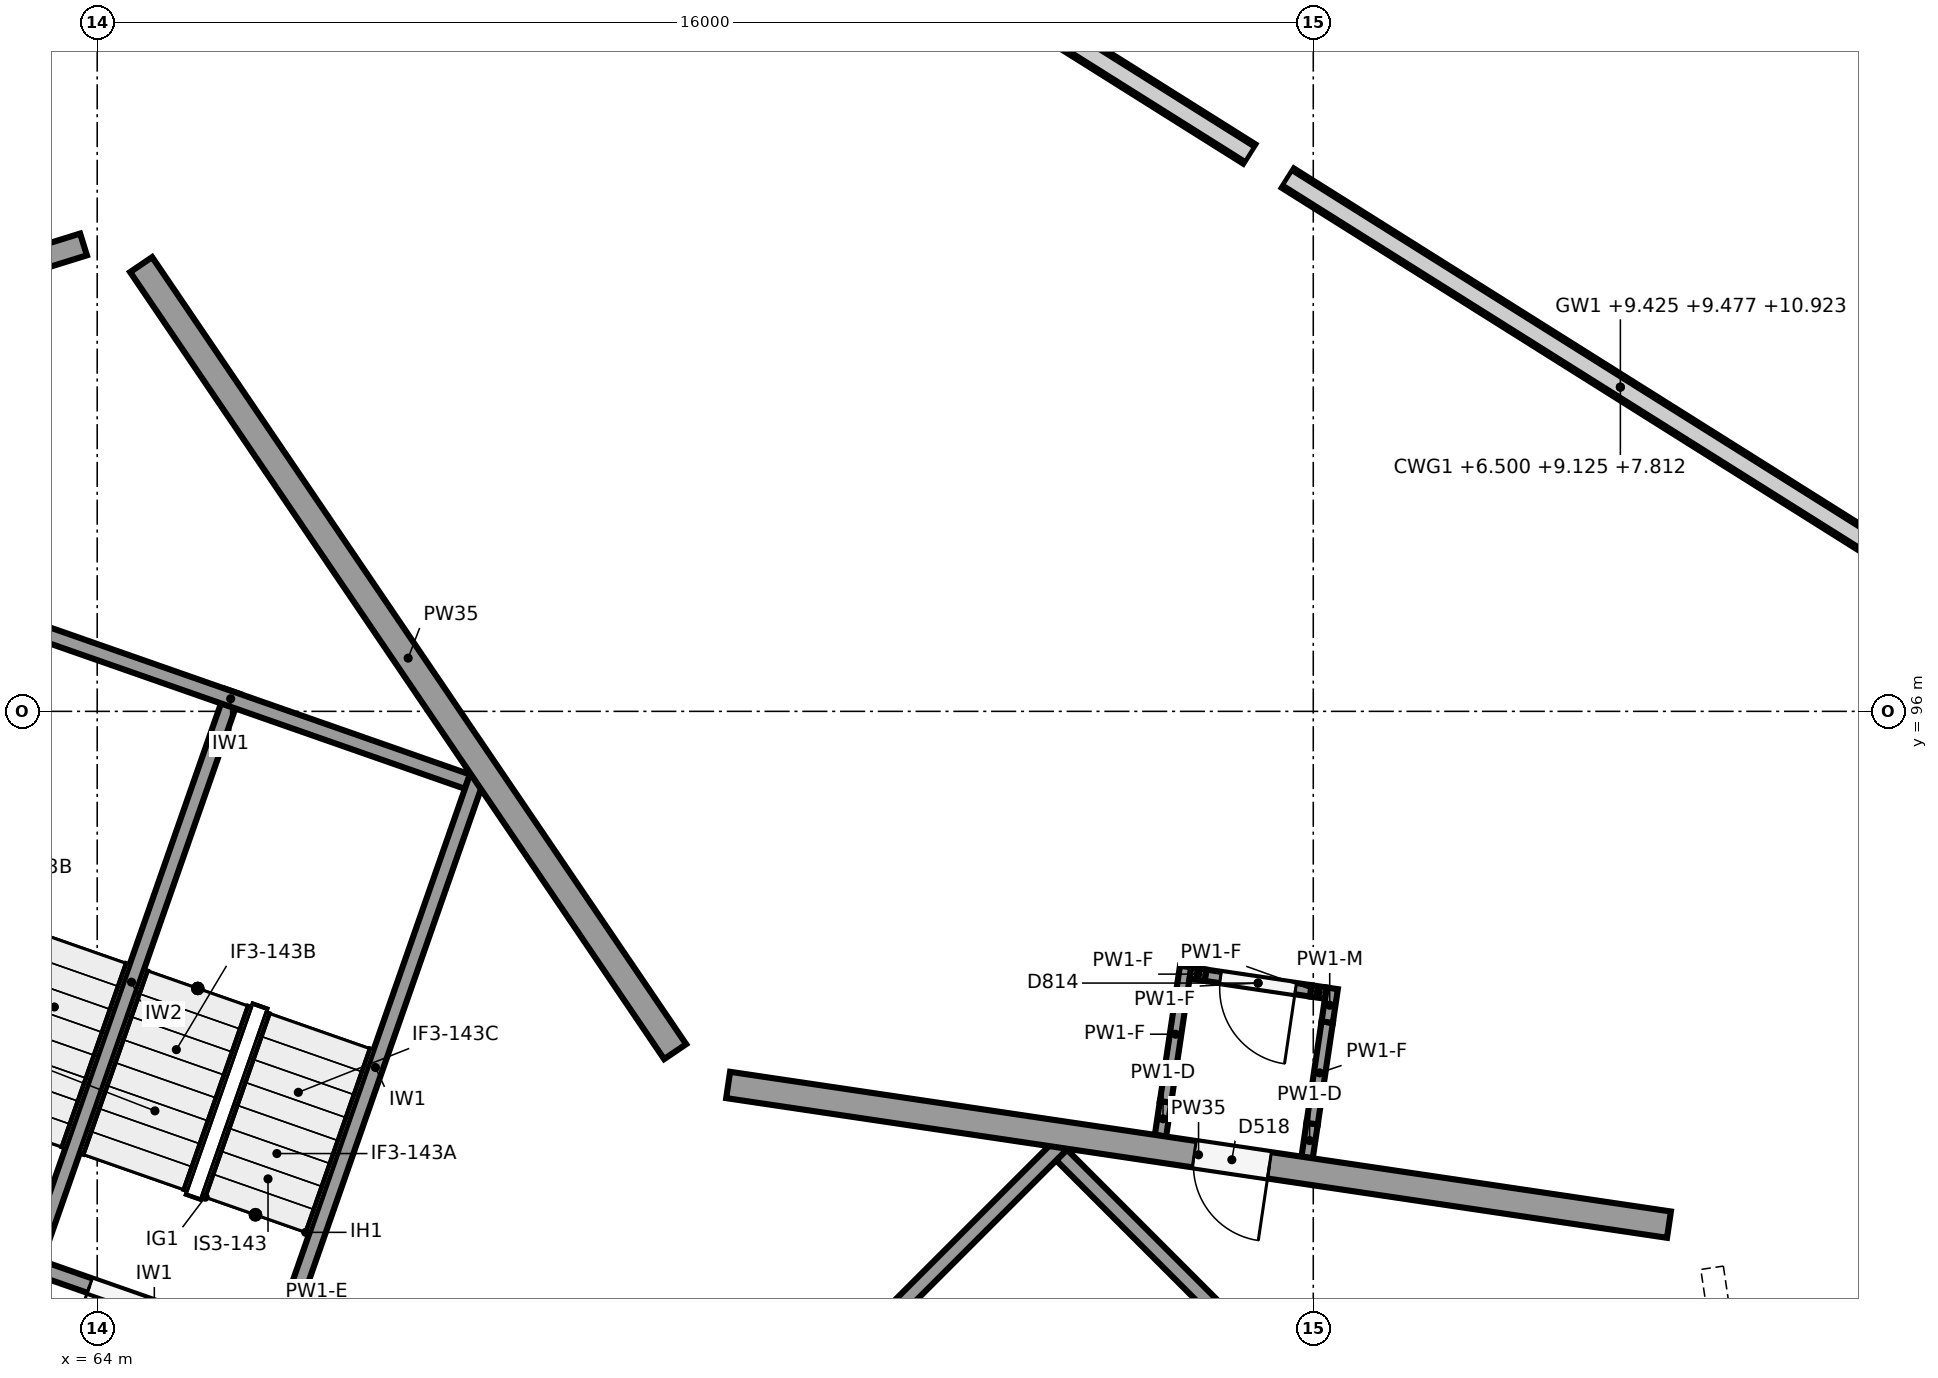
"""IFC4 building model, lengths in metres.
Left out: names, types, materials, properties, quantities, classifications, styles, units other than length and angle.
Written with IfcOpenShell. Run it as: python <this file> out.ifc"""

import sys

from ifc_helpers import new_model, si_unit, direction, frame, frame_2d, origin, origin_2d, place, context, subcontext, project, spatial, polyline, rectangle, circle, outline, extrude, element, fill, save


model = new_model("IFC4")
c1 = context("Model", 3, precision=1e-05, world=origin(), true_north=direction((0.0, 1.0)))
c2 = subcontext(c1, "Body", "Model", "MODEL_VIEW")
j1 = project(units=[si_unit("LENGTHUNIT", "METRE"), si_unit("PLANEANGLEUNIT", "RADIAN")], contexts=[c1])
p1 = place(None, origin())
s1 = spatial("IfcSite", under=j1, at=p1, CompositionType="ELEMENT")
p2 = place(p1, origin())
s2 = spatial("IfcBuilding", under=s1, at=p2, CompositionType="ELEMENT")
p3 = place(p2, frame((0.0, 0.0, 6.5)))
s3 = spatial("IfcBuildingStorey", under=s2, at=p3, CompositionType="ELEMENT", Elevation=6.5)
p4 = place(p3, frame((85.174, 89.174, 0.0), z_axis=(0.0, 0.0, 1.0), x_axis=(1.0, 0.0, 0.0)))
e1 = element("IfcColumn", 1, at=p4, inside=s3, PredefinedType="COLUMN", context=c2, shape_type="SweptSolid", body=[
    extrude(circle(Radius=0.5, at=origin_2d()), origin(), (0.0, 0.0, 1.0), 5.5),
])
p5 = place(p3, frame((71.857, 91.151, 0.0), z_axis=(0.0, 0.0, 1.0), x_axis=(1.0, 0.0, 0.0)))
e2 = element("IfcColumn", 2, at=p5, inside=s3, PredefinedType="COLUMN", context=c2, shape_type="SweptSolid", body=[
    extrude(circle(Radius=0.45, at=origin_2d()), origin(), (0.0, 0.0, 1.0), 5.5),
])
p6 = place(p3, frame((64.297, 102.291, 0.0), z_axis=(0.0, 0.0, 1.0), x_axis=(1.0, 0.0, 0.0)))
e3 = element("IfcColumn", 3, at=p6, inside=s3, PredefinedType="COLUMN", context=c2, shape_type="SweptSolid", body=[
    extrude(circle(Radius=0.5, at=origin_2d()), origin(), (0.0, 0.0, 1.0), 5.5),
])
p7 = place(p3, frame((87.427, 91.427, 0.0), z_axis=(0.0, 0.0, 1.0), x_axis=(1.0, 0.0, 0.0)))
e4 = element("IfcColumn", 4, at=p7, inside=s3, PredefinedType="COLUMN", context=c2, shape_type="SweptSolid", body=[
    extrude(circle(Radius=0.4, at=origin_2d()), origin(), (0.0, 0.0, 1.0), 5.5),
])
p8 = place(p3, frame((82.719, 90.939, 0.0), z_axis=(0.0, 0.0, 1.0), x_axis=(1.0, 0.0, 0.0)))
e5 = element("IfcColumn", 5, at=p8, inside=s3, PredefinedType="COLUMN", context=c2, shape_type="SweptSolid", body=[
    extrude(circle(Radius=0.3, at=origin_2d()), origin(), (0.0, 0.0, 1.0), 4.41),
])
p9 = place(p3, frame((74.836, 95.893, 0.0), z_axis=(0.0, 0.0, 1.0), x_axis=(1.0, 0.0, 0.0)))
e6 = element("IfcColumn", 6, at=p9, inside=s3, PredefinedType="COLUMN", context=c2, shape_type="SweptSolid", body=[
    extrude(circle(Radius=0.3, at=origin_2d()), origin(), (0.0, 0.0, 1.0), 3.107),
])
p10 = place(p3, frame((66.953, 100.846, 0.0), z_axis=(0.0, 0.0, 1.0), x_axis=(1.0, 0.0, 0.0)))
e7 = element("IfcColumn", 7, at=p10, inside=s3, PredefinedType="COLUMN", context=c2, shape_type="SweptSolid", body=[
    extrude(circle(Radius=0.3, at=origin_2d()), origin(), (0.0, 0.0, 1.0), 4.41),
])
p11 = place(p3, frame((84.463, 93.15, 0.0), z_axis=(0.0, 0.0, 1.0), x_axis=(1.0, 0.0, 0.0)))
e8 = element("IfcColumn", 8, at=p11, inside=s3, PredefinedType="COLUMN", context=c2, shape_type="SweptSolid", body=[
    extrude(circle(Radius=0.3, at=origin_2d()), origin(), (0.0, 0.0, 1.0), 4.396),
])
p12 = place(p3, frame((80.394, 95.707, 0.0), z_axis=(0.0, 0.0, 1.0), x_axis=(1.0, 0.0, 0.0)))
e9 = element("IfcColumn", 9, at=p12, inside=s3, PredefinedType="COLUMN", context=c2, shape_type="SweptSolid", body=[
    extrude(circle(Radius=0.3, at=origin_2d()), origin(), (0.0, 0.0, 1.0), 3.723),
])
p13 = place(p3, frame((76.326, 98.263, 0.0), z_axis=(0.0, 0.0, 1.0), x_axis=(1.0, 0.0, 0.0)))
e10 = element("IfcColumn", 10, at=p13, inside=s3, PredefinedType="COLUMN", context=c2, shape_type="SweptSolid", body=[
    extrude(circle(Radius=0.3, at=origin_2d()), origin(), (0.0, 0.0, 1.0), 3.051),
])
p14 = place(p3, frame((72.257, 100.82, 0.0), z_axis=(0.0, 0.0, 1.0), x_axis=(1.0, 0.0, 0.0)))
e11 = element("IfcColumn", 11, at=p14, inside=s3, PredefinedType="COLUMN", context=c2, shape_type="SweptSolid", body=[
    extrude(circle(Radius=0.3, at=origin_2d()), origin(), (0.0, 0.0, 1.0), 3.723),
])
p15 = place(p3, frame((68.189, 103.376, 0.0), z_axis=(0.0, 0.0, 1.0), x_axis=(1.0, 0.0, 0.0)))
e12 = element("IfcColumn", 12, at=p15, inside=s3, PredefinedType="COLUMN", context=c2, shape_type="SweptSolid", body=[
    extrude(circle(Radius=0.3, at=origin_2d()), origin(), (0.0, 0.0, 1.0), 4.396),
])
p16 = place(p3, frame((86.494, 95.181, 0.0), z_axis=(0.0, 0.0, 1.0), x_axis=(1.0, 0.0, 0.0)))
e13 = element("IfcColumn", 13, at=p16, inside=s3, PredefinedType="COLUMN", context=c2, shape_type="SweptSolid", body=[
    extrude(circle(Radius=0.3, at=origin_2d()), origin(), (0.0, 0.0, 1.0), 4.429),
])
p17 = place(p3, frame((82.155, 97.908, 0.0), z_axis=(0.0, 0.0, 1.0), x_axis=(1.0, 0.0, 0.0)))
e14 = element("IfcColumn", 14, at=p17, inside=s3, PredefinedType="COLUMN", context=c2, shape_type="SweptSolid", body=[
    extrude(circle(Radius=0.3, at=origin_2d()), origin(), (0.0, 0.0, 1.0), 3.712),
])
p18 = place(p3, frame((77.815, 100.634, 0.0), z_axis=(0.0, 0.0, 1.0), x_axis=(1.0, 0.0, 0.0)))
e15 = element("IfcColumn", 15, at=p18, inside=s3, PredefinedType="COLUMN", context=c2, shape_type="SweptSolid", body=[
    extrude(circle(Radius=0.3, at=origin_2d()), origin(), (0.0, 0.0, 1.0), 2.995),
])
p19 = place(p3, frame((73.477, 103.361, 0.0), z_axis=(0.0, 0.0, 1.0), x_axis=(1.0, 0.0, 0.0)))
e16 = element("IfcColumn", 16, at=p19, inside=s3, PredefinedType="COLUMN", context=c2, shape_type="SweptSolid", body=[
    extrude(circle(Radius=0.3, at=origin_2d()), origin(), (0.0, 0.0, 1.0), 3.712),
])
p20 = place(p3, frame((79.412, 103.174, 0.0), z_axis=(0.0, 0.0, 1.0), x_axis=(1.0, 0.0, 0.0)))
e17 = element("IfcColumn", 17, at=p20, inside=s3, PredefinedType="COLUMN", context=c2, shape_type="SweptSolid", body=[
    extrude(circle(Radius=0.3, at=origin_2d()), origin(), (0.0, 0.0, 1.0), 2.935),
])
p21 = place(p3, frame((88.415, 97.517, 2.925), z_axis=(0.0, 0.0, 1.0), x_axis=(-0.846725649112, 0.532029769032, 0.0)))
e18 = element("IfcWall", 18, at=p21, inside=s3, PredefinedType="SOLIDWALL", context=c2, shape_type="SweptSolid", body=[
    extrude(outline(polyline([(0.0, 0.0), (10.334, 0.0), (10.334, 0.052), (0.0, 1.499), (0.0, 0.0)])), frame((0.0, 0.15, 0.0), z_axis=(0.0, -1.0, 0.0), x_axis=(1.0, 0.0, 0.0)), (0.0, 0.0, 1.0), 0.3),
])
p22 = place(p3, frame((79.158, 103.334, 2.925), z_axis=(0.0, 0.0, 1.0), x_axis=(-0.846732336333, 0.532019126168, 0.0)))
e19 = element("IfcWall", 19, at=p22, inside=s3, PredefinedType="SOLIDWALL", context=c2, shape_type="SweptSolid", body=[
    extrude(outline(polyline([(0.0, 0.0), (10.334, 0.0), (10.334, 1.499), (0.0, 0.052), (0.0, 0.0)])), frame((0.0, 0.15, 0.0), z_axis=(0.0, -1.0, 0.0), x_axis=(1.0, 0.0, 0.0)), (0.0, 0.0, 1.0), 0.3),
])
p23 = place(p3, frame((85.247, 88.68, 0.0), z_axis=(0.0, 0.0, 1.0), x_axis=(0.14684632149, -0.989159318747, 0.0)))
e20 = element("IfcWall", 20, at=p23, inside=s3, PredefinedType="SOLIDWALL", context=c2, shape_type="SweptSolid", body=[
    extrude(rectangle(XDim=12.514, YDim=0.3, at=frame_2d((6.257, 0.0))), origin(), (0.0, 0.0, 1.0), 3.85),
])
p24 = place(p3, frame((72.301, 91.085, 0.0), z_axis=(0.0, 0.0, 1.0), x_axis=(0.989159318747, -0.14684632149, 0.0)))
e21 = element("IfcWall", 21, at=p24, inside=s3, PredefinedType="SOLIDWALL", context=c2, shape_type="SweptSolid", body=[
    extrude(rectangle(XDim=12.514, YDim=0.35, at=frame_2d((6.257, 0.0))), origin(), (0.0, 0.0, 1.0), 3.85),
])
p25 = place(p24, frame((6.2, 0.0, 0.0)))
e22 = element("IfcOpeningElement", 22, at=p25, cuts=e21, PredefinedType="OPENING", context=c2, shape_type="SweptSolid", body=[
    extrude(rectangle(XDim=1.0, YDim=2.1, at=frame_2d((0.5, 1.05))), frame((0.0, 0.185, 0.0), z_axis=(0.0, -1.0, 0.0), x_axis=(1.0, 0.0, 0.0)), (0.0, 0.0, 1.0), 0.37),
])
p26 = place(p3, frame((64.578, 101.877, 0.0), z_axis=(0.0, 0.0, 1.0), x_axis=(0.561493784496, -0.827480954447, 0.0)))
e23 = element("IfcWall", 23, at=p26, inside=s3, PredefinedType="SOLIDWALL", context=c2, shape_type="SweptSolid", body=[
    extrude(rectangle(XDim=12.513, YDim=0.35, at=frame_2d((6.257, 0.0))), origin(), (0.0, 0.0, 1.0), 3.85),
])
p27 = place(p3, frame((51.871, 98.428, 0.0), z_axis=(0.0, 0.0, 1.0), x_axis=(0.954916036354, 0.29687600697, 0.0)))
e24 = element("IfcWall", 24, at=p27, inside=s3, PredefinedType="SOLIDWALL", context=c2, shape_type="SweptSolid", body=[
    extrude(rectangle(XDim=12.513, YDim=0.3, at=frame_2d((6.257, 0.0))), origin(), (0.0, 0.0, 1.0), 3.85),
])
p28 = place(p3, frame((76.688, 90.305, 0.0), z_axis=(0.0, 0.0, 1.0), x_axis=(-0.707106781187, -0.707106781187, 0.0)))
e25 = element("IfcWall", 25, at=p28, inside=s3, PredefinedType="SHEAR", context=c2, shape_type="SweptSolid", body=[
    extrude(rectangle(XDim=9.8, YDim=0.2, at=frame_2d((4.9, 0.0))), origin(), (0.0, 0.0, 1.0), 5.15),
])
p29 = place(p3, frame((81.355, 85.497, 0.0), z_axis=(0.0, 0.0, 1.0), x_axis=(-0.707088285305, 0.707125276584, 0.0)))
e26 = element("IfcWall", 26, at=p29, inside=s3, PredefinedType="SHEAR", context=c2, shape_type="SweptSolid", body=[
    extrude(rectangle(XDim=6.6, YDim=0.2, at=frame_2d((3.3, 0.0))), origin(), (0.0, 0.0, 1.0), 5.15),
])
p30 = place(p3, frame((68.998, 95.137, 0.0), z_axis=(0.0, 0.0, 1.0), x_axis=(-0.330263153216, -0.943888896866, 0.0)))
e27 = element("IfcWall", 27, at=p30, inside=s3, PredefinedType="SHEAR", context=c2, shape_type="SweptSolid", body=[
    extrude(rectangle(XDim=8.1, YDim=0.2, at=frame_2d((4.05, 0.0))), origin(), (0.0, 0.0, 1.0), 5.15),
])
p31 = place(p3, frame((68.871, 95.076, 0.0), z_axis=(0.0, 0.0, 1.0), x_axis=(-0.943880844925, 0.330286164688, 0.0)))
e28 = element("IfcWall", 28, at=p31, inside=s3, PredefinedType="SHEAR", context=c2, shape_type="SweptSolid", body=[
    extrude(rectangle(XDim=6.6, YDim=0.2, at=frame_2d((3.3, 0.0))), origin(), (0.0, 0.0, 1.0), 5.15),
])
p32 = place(p3, frame((65.789, 96.26, 0.0), z_axis=(0.0, 0.0, 1.0), x_axis=(-0.330280610426, -0.943882788474, 0.0)))
e29 = element("IfcWall", 29, at=p32, inside=s3, PredefinedType="SHEAR", context=c2, shape_type="SweptSolid", body=[
    extrude(rectangle(XDim=8.1, YDim=0.2, at=frame_2d((4.05, 0.0))), origin(), (0.0, 0.0, 1.0), 5.15),
])
p33 = place(p3, frame((66.262, 87.619, 0.0), z_axis=(0.0, 0.0, 1.0), x_axis=(-0.943878576031, 0.330292648585, 0.0)))
e30 = element("IfcWall", 30, at=p33, inside=s3, PredefinedType="SHEAR", context=c2, shape_type="SweptSolid", body=[
    extrude(rectangle(XDim=3.2, YDim=0.2, at=frame_2d((1.6, 0.0))), origin(), (0.0, 0.0, 1.0), 5.15),
])
p34 = place(p33, frame((0.7, 0.0, 0.0)))
e31 = element("IfcOpeningElement", 31, at=p34, cuts=e30, PredefinedType="OPENING", context=c2, shape_type="SweptSolid", body=[
    extrude(rectangle(XDim=1.8, YDim=2.1, at=frame_2d((0.9, 1.05))), frame((0.0, 0.11, 0.0), z_axis=(0.0, -1.0, 0.0), x_axis=(1.0, 0.0, 0.0)), (0.0, 0.0, 1.0), 0.22),
])
p35 = place(p3, frame((77.99, 90.417, 0.0), z_axis=(0.0, 0.0, 1.0), x_axis=(0.147040245885, 0.98913051014, 0.0)))
e32 = element("IfcWall", 32, at=p35, inside=s3, PredefinedType="PARTITIONING", context=c2, shape_type="SweptSolid", body=[
    extrude(rectangle(XDim=0.45, YDim=0.15, at=frame_2d((0.225, 0.0))), origin(), (0.0, 0.0, 1.0), 3.85),
])
p36 = place(p3, frame((78.056, 90.862, 0.0), z_axis=(0.0, 0.0, 1.0), x_axis=(0.146755111639, 0.98917285507, 0.0)))
e33 = element("IfcWall", 33, at=p36, inside=s3, PredefinedType="PARTITIONING", context=c2, shape_type="SweptSolid", body=[
    extrude(rectangle(XDim=1.8, YDim=0.15, at=frame_2d((0.9, 0.0))), origin(), (0.0, 0.0, 1.0), 5.1),
])
p37 = place(p3, frame((79.919, 90.131, 0.0), z_axis=(0.0, 0.0, 1.0), x_axis=(0.147040245885, 0.98913051014, 0.0)))
e34 = element("IfcWall", 34, at=p37, inside=s3, PredefinedType="PARTITIONING", context=c2, shape_type="SweptSolid", body=[
    extrude(rectangle(XDim=0.45, YDim=0.15, at=frame_2d((0.225, 0.0))), origin(), (0.0, 0.0, 1.0), 3.85),
])
p38 = place(p3, frame((79.985, 90.576, 0.0), z_axis=(0.0, 0.0, 1.0), x_axis=(0.146837017969, 0.989160699863, 0.0)))
e35 = element("IfcWall", 35, at=p38, inside=s3, PredefinedType="PARTITIONING", context=c2, shape_type="SweptSolid", body=[
    extrude(rectangle(XDim=1.35, YDim=0.15, at=frame_2d((0.675, 0.0))), origin(), (0.0, 0.0, 1.0), 5.1),
])
p39 = place(p3, frame((80.183, 91.911, 0.0), z_axis=(0.0, 0.0, 1.0), x_axis=(0.147040245885, 0.98913051014, 0.0)))
e36 = element("IfcWall", 36, at=p39, inside=s3, PredefinedType="PARTITIONING", context=c2, shape_type="SweptSolid", body=[
    extrude(rectangle(XDim=0.45, YDim=0.15, at=frame_2d((0.225, 0.0))), origin(), (0.0, 0.0, 1.0), 3.107),
])
p40 = place(p3, frame((80.164, 92.293, 0.0), z_axis=(0.0, 0.0, 1.0), x_axis=(-0.989203462354, 0.146548661089, 0.0)))
e37 = element("IfcWall", 37, at=p40, inside=s3, PredefinedType="PARTITIONING", context=c2, shape_type="SweptSolid", body=[
    extrude(rectangle(XDim=0.2, YDim=0.15, at=frame_2d((0.1, 0.0))), origin(), (0.0, 0.0, 1.0), 5.1),
])
p41 = place(p3, frame((79.966, 92.323, 0.0), z_axis=(0.0, 0.0, 1.0), x_axis=(-0.989138771508, 0.146984661446, 0.0)))
e38 = element("IfcWall", 38, at=p41, inside=s3, PredefinedType="PARTITIONING", context=c2, shape_type="SweptSolid", body=[
    extrude(rectangle(XDim=1.4, YDim=0.15, at=frame_2d((0.7, 0.0))), origin(), (0.0, 0.0, 1.0), 5.1),
])
p42 = place(p41, frame((0.2, 0.0, 0.0)))
e39 = element("IfcOpeningElement", 39, at=p42, cuts=e38, PredefinedType="OPENING", context=c2, shape_type="SweptSolid", body=[
    extrude(rectangle(XDim=1.0, YDim=2.1, at=frame_2d((0.5, 1.05))), frame((0.0, 0.085, 0.0), z_axis=(0.0, -1.0, 0.0), x_axis=(1.0, 0.0, 0.0)), (0.0, 0.0, 1.0), 0.17),
])
p43 = place(p3, frame((78.581, 92.528, 0.0), z_axis=(0.0, 0.0, 1.0), x_axis=(-0.989203462354, 0.146548661089, 0.0)))
e40 = element("IfcWall", 40, at=p43, inside=s3, PredefinedType="PARTITIONING", context=c2, shape_type="SweptSolid", body=[
    extrude(rectangle(XDim=0.2, YDim=0.15, at=frame_2d((0.1, 0.0))), origin(), (0.0, 0.0, 1.0), 5.1),
])
p44 = place(p34, origin())
e41 = element("IfcDoor", 41, at=p44, inside=s3, OperationType="DOUBLE_DOOR_SINGLE_SWING", PredefinedType="DOOR", context=c2, shape_type="SweptSolid", body=[
    extrude(rectangle(XDim=1.8, YDim=2.1, at=frame_2d((0.9, 1.05))), frame((0.0, 0.025, 0.0), z_axis=(0.0, -1.0, 0.0), x_axis=(1.0, 0.0, 0.0)), (0.0, 0.0, 1.0), 0.05),
])
fill(e31, e41)
p45 = place(p25, frame((1.0, 0.0, 0.0), z_axis=(0.0, 0.0, 1.0), x_axis=(-1.0, 0.0, 0.0)))
e42 = element("IfcDoor", 42, at=p45, inside=s3, OperationType="SINGLE_SWING_LEFT", PredefinedType="DOOR", context=c2, shape_type="SweptSolid", body=[
    extrude(rectangle(XDim=1.0, YDim=2.1, at=frame_2d((0.5, 1.05))), frame((0.0, 0.025, 0.0), z_axis=(0.0, -1.0, 0.0), x_axis=(1.0, 0.0, 0.0)), (0.0, 0.0, 1.0), 0.05),
])
fill(e22, e42)
p46 = place(p42, origin())
e43 = element("IfcDoor", 43, at=p46, inside=s3, OperationType="SINGLE_SWING_LEFT", PredefinedType="DOOR", context=c2, shape_type="SweptSolid", body=[
    extrude(rectangle(XDim=1.0, YDim=2.1, at=frame_2d((0.5, 1.05))), frame((0.0, 0.025, 0.0), z_axis=(0.0, -1.0, 0.0), x_axis=(1.0, 0.0, 0.0)), (0.0, 0.0, 1.0), 0.05),
])
fill(e39, e43)
save(model, sys.argv[1])
